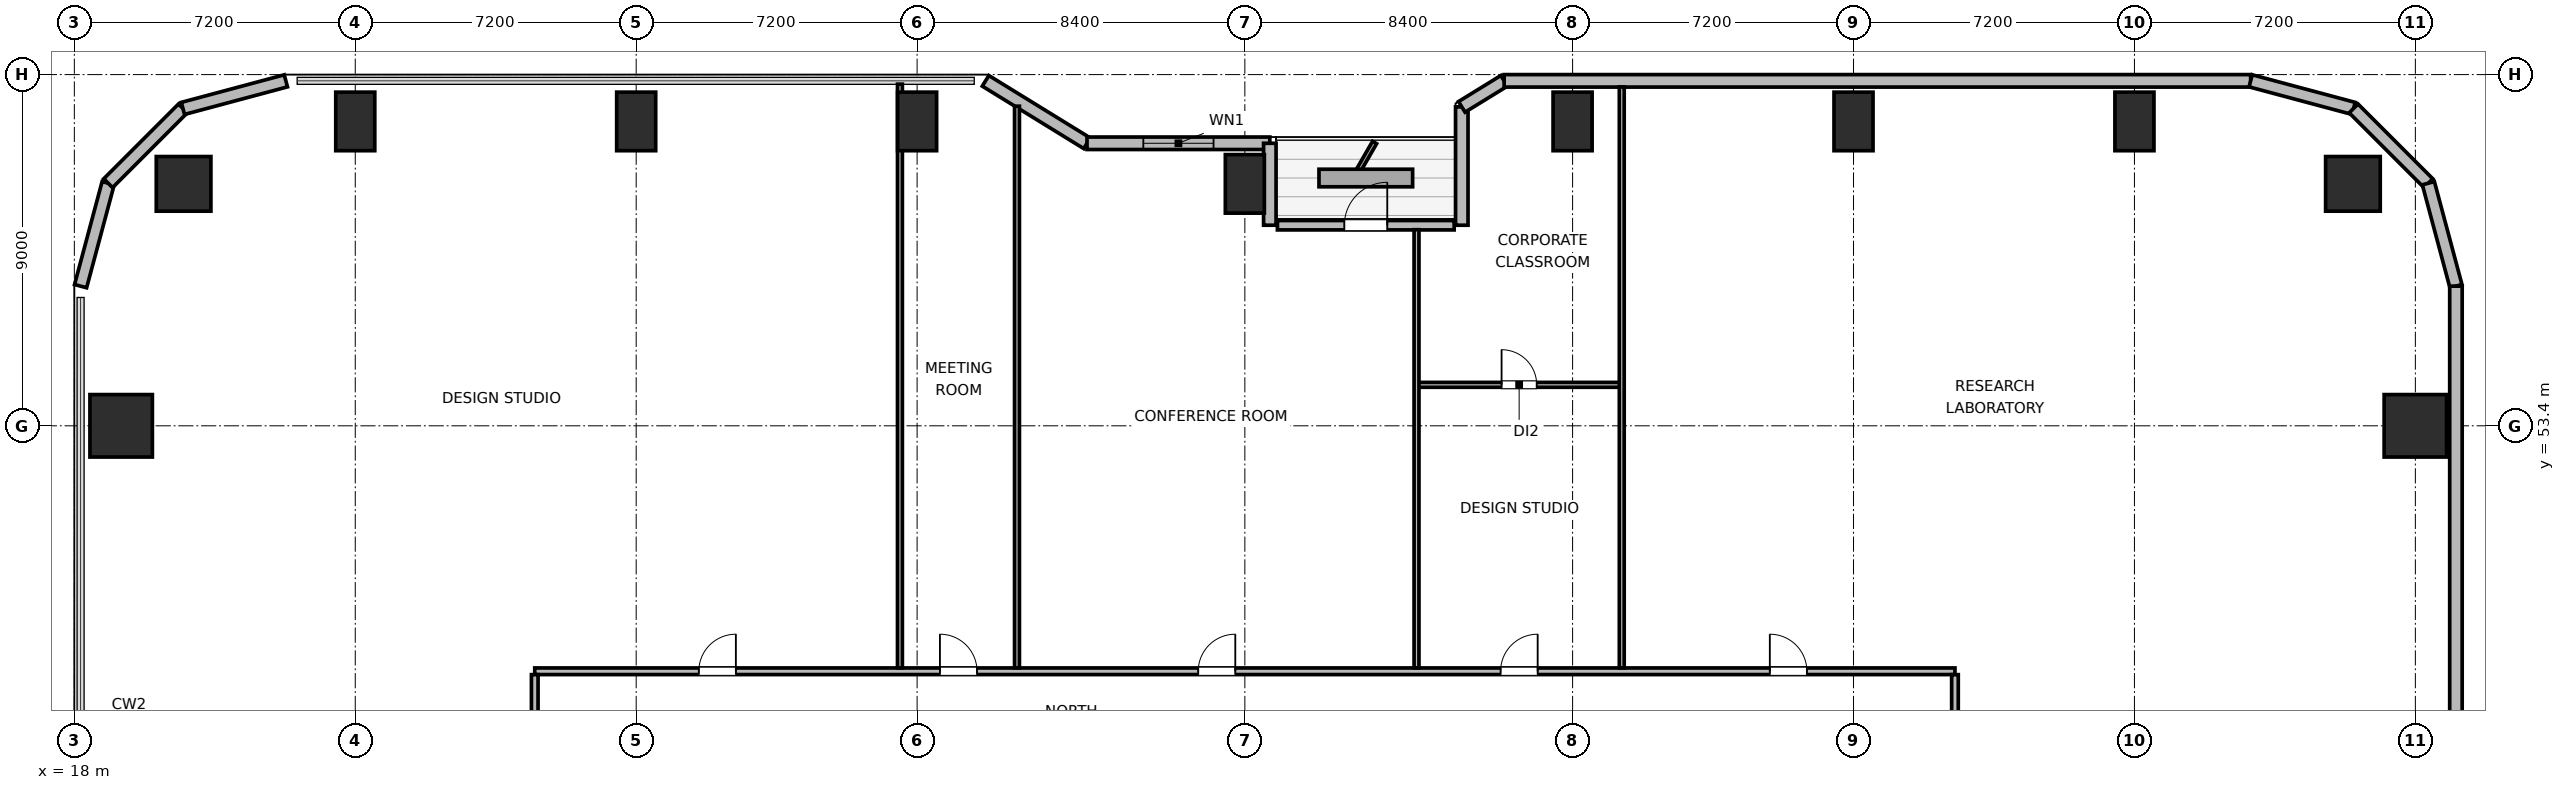
"""IFC4 building model, lengths in metres.
Left out: names, types, materials, properties, quantities, classifications, styles, units other than length and angle.
Written with IfcOpenShell. Run it as: python <this file> out.ifc"""

import sys

from ifc_helpers import new_model, si_unit, direction, frame, frame_2d, origin, origin_2d, place, context, subcontext, project, spatial, rectangle, circle, extrude, element, fill, save


model = new_model("IFC4")
c1 = context("Model", 3, precision=1e-05, world=origin(), true_north=direction((0.0, 1.0)))
c2 = subcontext(c1, "Body", "Model", "MODEL_VIEW")
j1 = project(units=[si_unit("LENGTHUNIT", "METRE"), si_unit("PLANEANGLEUNIT", "RADIAN")], contexts=[c1])
p1 = place(None, origin())
s1 = spatial("IfcSite", under=j1, at=p1, CompositionType="ELEMENT")
p2 = place(p1, origin())
s2 = spatial("IfcBuilding", under=s1, at=p2, CompositionType="ELEMENT")
p3 = place(p2, frame((0.0, 0.0, 45.0)))
s3 = spatial("IfcBuildingStorey", under=s2, at=p3, CompositionType="ELEMENT", Elevation=45.0)
for number, where, z_axis, x_axis in (
    (1, (76.4, 59.6, 0.0), (0.0, 0.0, 1.0), (1.0, 0.0, 0.0)),
    (2, (20.8, 59.6, 0.0), (0.0, 0.0, 1.0), (1.0, 0.0, 0.0)),
):
    element("IfcColumn", number, at=place(p3, frame(where, z_axis=z_axis, x_axis=x_axis)), inside=s3, PredefinedType="COLUMN", context=c2, shape_type="SweptSolid", body=[
        extrude(circle(Radius=0.7, at=origin_2d()), origin(), (0.0, 0.0, 1.0), 3.9),
    ])
for number, where, z_axis, x_axis in (
    (3, (25.2, 61.2, 0.0), (0.0, 0.0, 1.0), (1.0, 0.0, 0.0)),
    (4, (32.4, 61.2, 0.0), (0.0, 0.0, 1.0), (1.0, 0.0, 0.0)),
    (5, (39.6, 61.2, 0.0), (0.0, 0.0, 1.0), (1.0, 0.0, 0.0)),
    (6, (48.0, 59.6, 0.0), (0.0, 0.0, 1.0), (1.0, 0.0, 0.0)),
    (7, (56.4, 61.2, 0.0), (0.0, 0.0, 1.0), (1.0, 0.0, 0.0)),
    (8, (63.6, 61.2, 0.0), (0.0, 0.0, 1.0), (1.0, 0.0, 0.0)),
    (9, (70.8, 61.2, 0.0), (0.0, 0.0, 1.0), (1.0, 0.0, 0.0)),
):
    element("IfcColumn", number, at=place(p3, frame(where, z_axis=z_axis, x_axis=x_axis)), inside=s3, PredefinedType="COLUMN", context=c2, shape_type="SweptSolid", body=[
        extrude(rectangle(XDim=1.0, YDim=1.5, at=origin_2d()), origin(), (0.0, 0.0, 1.0), 3.9),
    ])
for number, where, z_axis, x_axis in (
    (10, (19.2, 53.4, 0.0), (0.0, 0.0, 1.0), (1.0, 0.0, 0.0)),
    (11, (78.0, 53.4, 0.0), (0.0, 0.0, 1.0), (1.0, 0.0, 0.0)),
):
    element("IfcColumn", number, at=place(p3, frame(where, z_axis=z_axis, x_axis=x_axis)), inside=s3, PredefinedType="COLUMN", context=c2, shape_type="SweptSolid", body=[
        extrude(rectangle(XDim=1.6, YDim=1.6, at=origin_2d()), origin(), (0.0, 0.0, 1.0), 3.9),
    ])
p4 = place(p3, frame((18.16, 56.979, 0.0), z_axis=(0.0, 0.0, 1.0), x_axis=(0.25869736047, 0.965958423373, 0.0)))
e12 = element("IfcWall", 12, at=p4, inside=s3, PredefinedType="SOLIDWALL", context=c2, shape_type="SweptSolid", body=[
    extrude(rectangle(XDim=2.731, YDim=0.32, at=frame_2d((1.366, 0.0))), origin(), (0.0, 0.0, 1.0), 3.64),
])
p5 = place(p3, frame((18.866, 59.617, 0.0), z_axis=(0.0, 0.0, 1.0), x_axis=(0.707106781187, 0.707106781187, 0.0)))
e13 = element("IfcWall", 13, at=p5, inside=s3, PredefinedType="SOLIDWALL", context=c2, shape_type="SweptSolid", body=[
    extrude(rectangle(XDim=2.71, YDim=0.32, at=frame_2d((1.355, 0.0))), origin(), (0.0, 0.0, 1.0), 3.64),
])
p6 = place(p3, frame((20.783, 61.533, 0.0), z_axis=(0.0, 0.0, 1.0), x_axis=(0.965964405026, 0.25867502435, 0.0)))
e14 = element("IfcWall", 14, at=p6, inside=s3, PredefinedType="SOLIDWALL", context=c2, shape_type="SweptSolid", body=[
    extrude(rectangle(XDim=2.731, YDim=0.32, at=frame_2d((1.366, 0.0))), origin(), (0.0, 0.0, 1.0), 3.64),
])
p7 = place(p3, frame((41.355, 62.24, 0.0), z_axis=(0.0, 0.0, 1.0), x_axis=(0.851630857047, -0.524142044989, 0.0)))
e15 = element("IfcWall", 15, at=p7, inside=s3, PredefinedType="SOLIDWALL", context=c2, shape_type="SweptSolid", body=[
    extrude(rectangle(XDim=3.053, YDim=0.32, at=frame_2d((1.526, 0.0))), origin(), (0.0, 0.0, 1.0), 2.875),
])
p8 = place(p3, frame((43.955, 60.64, 0.0), z_axis=(0.0, 0.0, 1.0), x_axis=(1.0, 0.0, 0.0)))
e16 = element("IfcWall", 16, at=p8, inside=s3, PredefinedType="SOLIDWALL", context=c2, shape_type="SweptSolid", body=[
    extrude(rectangle(XDim=4.685, YDim=0.32, at=frame_2d((2.343, 0.0))), origin(), (0.0, 0.0, 1.0), 2.875),
])
p9 = place(p8, frame((1.443, 0.0, 0.85)))
e17 = element("IfcOpeningElement", 17, at=p9, cuts=e16, PredefinedType="OPENING", context=c2, shape_type="SweptSolid", body=[
    extrude(rectangle(XDim=1.8, YDim=1.1, at=frame_2d((0.9, 0.55))), frame((0.0, 0.17, 0.0), z_axis=(0.0, -1.0, 0.0), x_axis=(1.0, 0.0, 0.0)), (0.0, 0.0, 1.0), 0.34),
])
p10 = place(p3, frame((48.64, 60.64, 0.0), z_axis=(0.0, 0.0, 1.0), x_axis=(0.0, -1.0, 0.0)))
e18 = element("IfcWall", 18, at=p10, inside=s3, PredefinedType="SOLIDWALL", context=c2, shape_type="SweptSolid", body=[
    extrude(rectangle(XDim=2.1, YDim=0.32, at=frame_2d((1.05, 0.0))), origin(), (0.0, 0.0, 1.0), 2.875),
])
p11 = place(p3, frame((48.835, 58.54, 0.0), z_axis=(0.0, 0.0, 1.0), x_axis=(1.0, 0.0, 0.0)))
e19 = element("IfcWall", 19, at=p11, inside=s3, PredefinedType="SOLIDWALL", context=c2, shape_type="SweptSolid", body=[
    extrude(rectangle(XDim=4.53, YDim=0.24, at=frame_2d((2.265, 0.0))), origin(), (0.0, 0.0, 1.0), 3.64),
])
p12 = place(p11, frame((1.715, 0.0, 0.0)))
e20 = element("IfcOpeningElement", 20, at=p12, cuts=e19, PredefinedType="OPENING", context=c2, shape_type="SweptSolid", body=[
    extrude(rectangle(XDim=1.1, YDim=2.04, at=frame_2d((0.55, 1.02))), frame((0.0, 0.13, 0.0), z_axis=(0.0, -1.0, 0.0), x_axis=(1.0, 0.0, 0.0)), (0.0, 0.0, 1.0), 0.26),
])
p13 = place(p3, frame((53.56, 58.54, 0.0), z_axis=(0.0, 0.0, 1.0), x_axis=(0.0, 1.0, 0.0)))
e21 = element("IfcWall", 21, at=p13, inside=s3, PredefinedType="SOLIDWALL", context=c2, shape_type="SweptSolid", body=[
    extrude(rectangle(XDim=3.032, YDim=0.32, at=frame_2d((1.516, 0.0))), origin(), (0.0, 0.0, 1.0), 2.875),
])
p14 = place(p3, frame((53.56, 61.573, 0.0), z_axis=(0.0, 0.0, 1.0), x_axis=(0.851776724646, 0.523904964045, 0.0)))
e22 = element("IfcWall", 22, at=p14, inside=s3, PredefinedType="SOLIDWALL", context=c2, shape_type="SweptSolid", body=[
    extrude(rectangle(XDim=1.274, YDim=0.32, at=frame_2d((0.637, 0.0))), origin(), (0.0, 0.0, 1.0), 3.64),
])
p15 = place(p3, frame((54.645, 62.24, 0.0), z_axis=(0.0, 0.0, 1.0), x_axis=(1.0, 0.0, 0.0)))
e23 = element("IfcWall", 23, at=p15, inside=s3, PredefinedType="SOLIDWALL", context=c2, shape_type="SweptSolid", body=[
    extrude(rectangle(XDim=19.134, YDim=0.32, at=frame_2d((9.567, 0.0))), origin(), (0.0, 0.0, 1.0), 3.64),
])
p16 = place(p3, frame((73.779, 62.24, 0.0), z_axis=(0.0, 0.0, 1.0), x_axis=(0.965964405026, -0.25867502435, 0.0)))
e24 = element("IfcWall", 24, at=p16, inside=s3, PredefinedType="SOLIDWALL", context=c2, shape_type="SweptSolid", body=[
    extrude(rectangle(XDim=2.731, YDim=0.32, at=frame_2d((1.366, 0.0))), origin(), (0.0, 0.0, 1.0), 3.64),
])
p17 = place(p3, frame((76.417, 61.533, 0.0), z_axis=(0.0, 0.0, 1.0), x_axis=(0.707106781187, -0.707106781187, 0.0)))
e25 = element("IfcWall", 25, at=p17, inside=s3, PredefinedType="SOLIDWALL", context=c2, shape_type="SweptSolid", body=[
    extrude(rectangle(XDim=2.71, YDim=0.32, at=frame_2d((1.355, 0.0))), origin(), (0.0, 0.0, 1.0), 3.64),
])
p18 = place(p3, frame((78.333, 59.617, 0.0), z_axis=(0.0, 0.0, 1.0), x_axis=(0.25869736047, -0.965958423373, 0.0)))
e26 = element("IfcWall", 26, at=p18, inside=s3, PredefinedType="SOLIDWALL", context=c2, shape_type="SweptSolid", body=[
    extrude(rectangle(XDim=2.731, YDim=0.32, at=frame_2d((1.366, 0.0))), origin(), (0.0, 0.0, 1.0), 3.64),
])
p19 = place(p3, frame((79.04, 56.979, 0.0), z_axis=(0.0, 0.0, 1.0), x_axis=(0.0, -1.0, 0.0)))
e27 = element("IfcWall", 27, at=p19, inside=s3, PredefinedType="SOLIDWALL", context=c2, shape_type="SweptSolid", body=[
    extrude(rectangle(XDim=14.219, YDim=0.32, at=frame_2d((7.109, 0.0))), origin(), (0.0, 0.0, 1.0), 3.64),
])
p20 = place(p3, frame((29.8, 47.11, 0.0), z_axis=(0.0, 0.0, 1.0), x_axis=(1.0, 0.0, 0.0)))
e28 = element("IfcWall", 28, at=p20, inside=s3, PredefinedType="PARTITIONING", context=c2, shape_type="SweptSolid", body=[
    extrude(rectangle(XDim=36.4, YDim=0.17, at=frame_2d((18.2, 0.0))), origin(), (0.0, 0.0, 1.0), 3.64),
])
p21 = place(p20, frame((4.205, 0.0, 0.0)))
e29 = element("IfcOpeningElement", 29, at=p21, cuts=e28, PredefinedType="OPENING", context=c2, shape_type="SweptSolid", body=[
    extrude(rectangle(XDim=0.95, YDim=2.04, at=frame_2d((0.475, 1.02))), frame((0.0, 0.095, 0.0), z_axis=(0.0, -1.0, 0.0), x_axis=(1.0, 0.0, 0.0)), (0.0, 0.0, 1.0), 0.19),
])
p22 = place(p20, frame((10.385, 0.0, 0.0)))
e30 = element("IfcOpeningElement", 30, at=p22, cuts=e28, PredefinedType="OPENING", context=c2, shape_type="SweptSolid", body=[
    extrude(rectangle(XDim=0.95, YDim=2.04, at=frame_2d((0.475, 1.02))), frame((0.0, 0.095, 0.0), z_axis=(0.0, -1.0, 0.0), x_axis=(1.0, 0.0, 0.0)), (0.0, 0.0, 1.0), 0.19),
])
p23 = place(p20, frame((17.005, 0.0, 0.0)))
e31 = element("IfcOpeningElement", 31, at=p23, cuts=e28, PredefinedType="OPENING", context=c2, shape_type="SweptSolid", body=[
    extrude(rectangle(XDim=0.95, YDim=2.04, at=frame_2d((0.475, 1.02))), frame((0.0, 0.095, 0.0), z_axis=(0.0, -1.0, 0.0), x_axis=(1.0, 0.0, 0.0)), (0.0, 0.0, 1.0), 0.19),
])
p24 = place(p20, frame((24.755, 0.0, 0.0)))
e32 = element("IfcOpeningElement", 32, at=p24, cuts=e28, PredefinedType="OPENING", context=c2, shape_type="SweptSolid", body=[
    extrude(rectangle(XDim=0.95, YDim=2.04, at=frame_2d((0.475, 1.02))), frame((0.0, 0.095, 0.0), z_axis=(0.0, -1.0, 0.0), x_axis=(1.0, 0.0, 0.0)), (0.0, 0.0, 1.0), 0.19),
])
p25 = place(p20, frame((31.655, 0.0, 0.0)))
e33 = element("IfcOpeningElement", 33, at=p25, cuts=e28, PredefinedType="OPENING", context=c2, shape_type="SweptSolid", body=[
    extrude(rectangle(XDim=0.95, YDim=2.04, at=frame_2d((0.475, 1.02))), frame((0.0, 0.095, 0.0), z_axis=(0.0, -1.0, 0.0), x_axis=(1.0, 0.0, 0.0)), (0.0, 0.0, 1.0), 0.19),
])
p26 = place(p3, frame((29.8, 24.977, 0.0), z_axis=(0.0, 0.0, 1.0), x_axis=(0.0, 1.0, 0.0)))
e34 = element("IfcWall", 34, at=p26, inside=s3, PredefinedType="PARTITIONING", context=c2, shape_type="SweptSolid", body=[
    extrude(rectangle(XDim=22.046, YDim=0.17, at=frame_2d((11.023, 0.0))), origin(), (0.0, 0.0, 1.0), 3.64),
])
p27 = place(p26, frame((10.548, 0.0, 0.0)))
e35 = element("IfcOpeningElement", 35, at=p27, cuts=e34, PredefinedType="OPENING", context=c2, shape_type="SweptSolid", body=[
    extrude(rectangle(XDim=0.95, YDim=2.04, at=frame_2d((0.475, 1.02))), frame((0.0, 0.095, 0.0), z_axis=(0.0, -1.0, 0.0), x_axis=(1.0, 0.0, 0.0)), (0.0, 0.0, 1.0), 0.19),
])
p28 = place(p3, frame((66.2, 24.977, 0.0), z_axis=(0.0, 0.0, 1.0), x_axis=(0.0, 1.0, 0.0)))
e36 = element("IfcWall", 36, at=p28, inside=s3, PredefinedType="PARTITIONING", context=c2, shape_type="SweptSolid", body=[
    extrude(rectangle(XDim=22.046, YDim=0.17, at=frame_2d((11.023, 0.0))), origin(), (0.0, 0.0, 1.0), 3.64),
])
p29 = place(p28, frame((4.493, 0.0, 0.0)))
e37 = element("IfcOpeningElement", 37, at=p29, cuts=e36, PredefinedType="OPENING", context=c2, shape_type="SweptSolid", body=[
    extrude(rectangle(XDim=0.95, YDim=2.04, at=frame_2d((0.475, 1.02))), frame((0.0, 0.095, 0.0), z_axis=(0.0, -1.0, 0.0), x_axis=(1.0, 0.0, 0.0)), (0.0, 0.0, 1.0), 0.19),
])
p30 = place(p28, frame((15.603, 0.0, 0.0)))
e38 = element("IfcOpeningElement", 38, at=p30, cuts=e36, PredefinedType="OPENING", context=c2, shape_type="SweptSolid", body=[
    extrude(rectangle(XDim=0.95, YDim=2.04, at=frame_2d((0.475, 1.02))), frame((0.0, 0.095, 0.0), z_axis=(0.0, -1.0, 0.0), x_axis=(1.0, 0.0, 0.0)), (0.0, 0.0, 1.0), 0.19),
])
p31 = place(p3, frame((39.16, 47.197, 0.0), z_axis=(0.0, 0.0, 1.0), x_axis=(0.0, 1.0, 0.0)))
e39 = element("IfcWall", 39, at=p31, inside=s3, PredefinedType="PARTITIONING", context=c2, shape_type="SweptSolid", body=[
    extrude(rectangle(XDim=14.958, YDim=0.125, at=frame_2d((7.479, 0.0))), origin(), (0.0, 0.0, 1.0), 3.64),
])
p32 = place(p3, frame((42.16, 47.197, 0.0), z_axis=(0.0, 0.0, 1.0), x_axis=(0.0, 1.0, 0.0)))
e40 = element("IfcWall", 40, at=p32, inside=s3, PredefinedType="PARTITIONING", context=c2, shape_type="SweptSolid", body=[
    extrude(rectangle(XDim=14.393, YDim=0.125, at=frame_2d((7.197, 0.0))), origin(), (0.0, 0.0, 1.0), 3.003),
])
p33 = place(p3, frame((52.4, 54.45, 0.0), z_axis=(0.0, 0.0, 1.0), x_axis=(1.0, 0.0, 0.0)))
e41 = element("IfcWall", 41, at=p33, inside=s3, PredefinedType="PARTITIONING", context=c2, shape_type="SweptSolid", body=[
    extrude(rectangle(XDim=5.26, YDim=0.125, at=frame_2d((2.63, 0.0))), origin(), (0.0, 0.0, 1.0), 3.64),
])
p34 = place(p33, frame((2.18, 0.0, 0.0)))
e42 = element("IfcOpeningElement", 42, at=p34, cuts=e41, PredefinedType="OPENING", context=c2, shape_type="SweptSolid", body=[
    extrude(rectangle(XDim=0.9, YDim=2.02, at=frame_2d((0.45, 1.01))), frame((0.0, 0.073, 0.0), z_axis=(0.0, -1.0, 0.0), x_axis=(1.0, 0.0, 0.0)), (0.0, 0.0, 1.0), 0.145),
])
p35 = place(p3, frame((52.4, 47.197, 0.0), z_axis=(0.0, 0.0, 1.0), x_axis=(0.0, 1.0, 0.0)))
e43 = element("IfcWall", 43, at=p35, inside=s3, PredefinedType="PARTITIONING", context=c2, shape_type="SweptSolid", body=[
    extrude(rectangle(XDim=11.228, YDim=0.125, at=frame_2d((5.614, 0.0))), origin(), (0.0, 0.0, 1.0), 3.003),
])
p36 = place(p3, frame((57.66, 47.197, 0.0), z_axis=(0.0, 0.0, 1.0), x_axis=(0.0, 1.0, 0.0)))
e44 = element("IfcWall", 44, at=p36, inside=s3, PredefinedType="PARTITIONING", context=c2, shape_type="SweptSolid", body=[
    extrude(rectangle(XDim=14.888, YDim=0.125, at=frame_2d((7.444, 0.0))), origin(), (0.0, 0.0, 1.0), 3.64),
])
p37 = place(p9, origin())
e45 = element("IfcWindow", 45, at=p37, inside=s3, PartitioningType="SINGLE_PANEL", PredefinedType="WINDOW", context=c2, shape_type="SweptSolid", body=[
    extrude(rectangle(XDim=1.8, YDim=1.1, at=frame_2d((0.9, 0.55))), frame((0.0, 0.03, 0.0), z_axis=(0.0, -1.0, 0.0), x_axis=(1.0, 0.0, 0.0)), (0.0, 0.0, 1.0), 0.06),
])
fill(e17, e45)
p38 = place(p12, origin())
e46 = element("IfcDoor", 46, at=p38, inside=s3, OperationType="SINGLE_SWING_RIGHT", PredefinedType="DOOR", context=c2, shape_type="SweptSolid", body=[
    extrude(rectangle(XDim=1.1, YDim=2.04, at=frame_2d((0.55, 1.02))), frame((0.0, 0.025, 0.0), z_axis=(0.0, -1.0, 0.0), x_axis=(1.0, 0.0, 0.0)), (0.0, 0.0, 1.0), 0.05),
])
fill(e20, e46)
p39 = place(p21, origin())
e47 = element("IfcDoor", 47, at=p39, inside=s3, OperationType="SINGLE_SWING_RIGHT", PredefinedType="DOOR", context=c2, shape_type="SweptSolid", body=[
    extrude(rectangle(XDim=0.95, YDim=2.04, at=frame_2d((0.475, 1.02))), frame((0.0, 0.025, 0.0), z_axis=(0.0, -1.0, 0.0), x_axis=(1.0, 0.0, 0.0)), (0.0, 0.0, 1.0), 0.05),
])
fill(e29, e47)
p40 = place(p22, origin())
e48 = element("IfcDoor", 48, at=p40, inside=s3, OperationType="SINGLE_SWING_LEFT", PredefinedType="DOOR", context=c2, shape_type="SweptSolid", body=[
    extrude(rectangle(XDim=0.95, YDim=2.04, at=frame_2d((0.475, 1.02))), frame((0.0, 0.025, 0.0), z_axis=(0.0, -1.0, 0.0), x_axis=(1.0, 0.0, 0.0)), (0.0, 0.0, 1.0), 0.05),
])
fill(e30, e48)
p41 = place(p23, origin())
e49 = element("IfcDoor", 49, at=p41, inside=s3, OperationType="SINGLE_SWING_RIGHT", PredefinedType="DOOR", context=c2, shape_type="SweptSolid", body=[
    extrude(rectangle(XDim=0.95, YDim=2.04, at=frame_2d((0.475, 1.02))), frame((0.0, 0.025, 0.0), z_axis=(0.0, -1.0, 0.0), x_axis=(1.0, 0.0, 0.0)), (0.0, 0.0, 1.0), 0.05),
])
fill(e31, e49)
p42 = place(p34, origin())
e50 = element("IfcDoor", 50, at=p42, inside=s3, OperationType="SINGLE_SWING_LEFT", PredefinedType="DOOR", context=c2, shape_type="SweptSolid", body=[
    extrude(rectangle(XDim=0.9, YDim=2.02, at=frame_2d((0.45, 1.01))), frame((0.0, 0.025, 0.0), z_axis=(0.0, -1.0, 0.0), x_axis=(1.0, 0.0, 0.0)), (0.0, 0.0, 1.0), 0.05),
])
fill(e42, e50)
p43 = place(p24, origin())
e51 = element("IfcDoor", 51, at=p43, inside=s3, OperationType="SINGLE_SWING_RIGHT", PredefinedType="DOOR", context=c2, shape_type="SweptSolid", body=[
    extrude(rectangle(XDim=0.95, YDim=2.04, at=frame_2d((0.475, 1.02))), frame((0.0, 0.025, 0.0), z_axis=(0.0, -1.0, 0.0), x_axis=(1.0, 0.0, 0.0)), (0.0, 0.0, 1.0), 0.05),
])
fill(e32, e51)
p44 = place(p25, origin())
e52 = element("IfcDoor", 52, at=p44, inside=s3, OperationType="SINGLE_SWING_LEFT", PredefinedType="DOOR", context=c2, shape_type="SweptSolid", body=[
    extrude(rectangle(XDim=0.95, YDim=2.04, at=frame_2d((0.475, 1.02))), frame((0.0, 0.025, 0.0), z_axis=(0.0, -1.0, 0.0), x_axis=(1.0, 0.0, 0.0)), (0.0, 0.0, 1.0), 0.05),
])
fill(e33, e52)
save(model, sys.argv[1])
